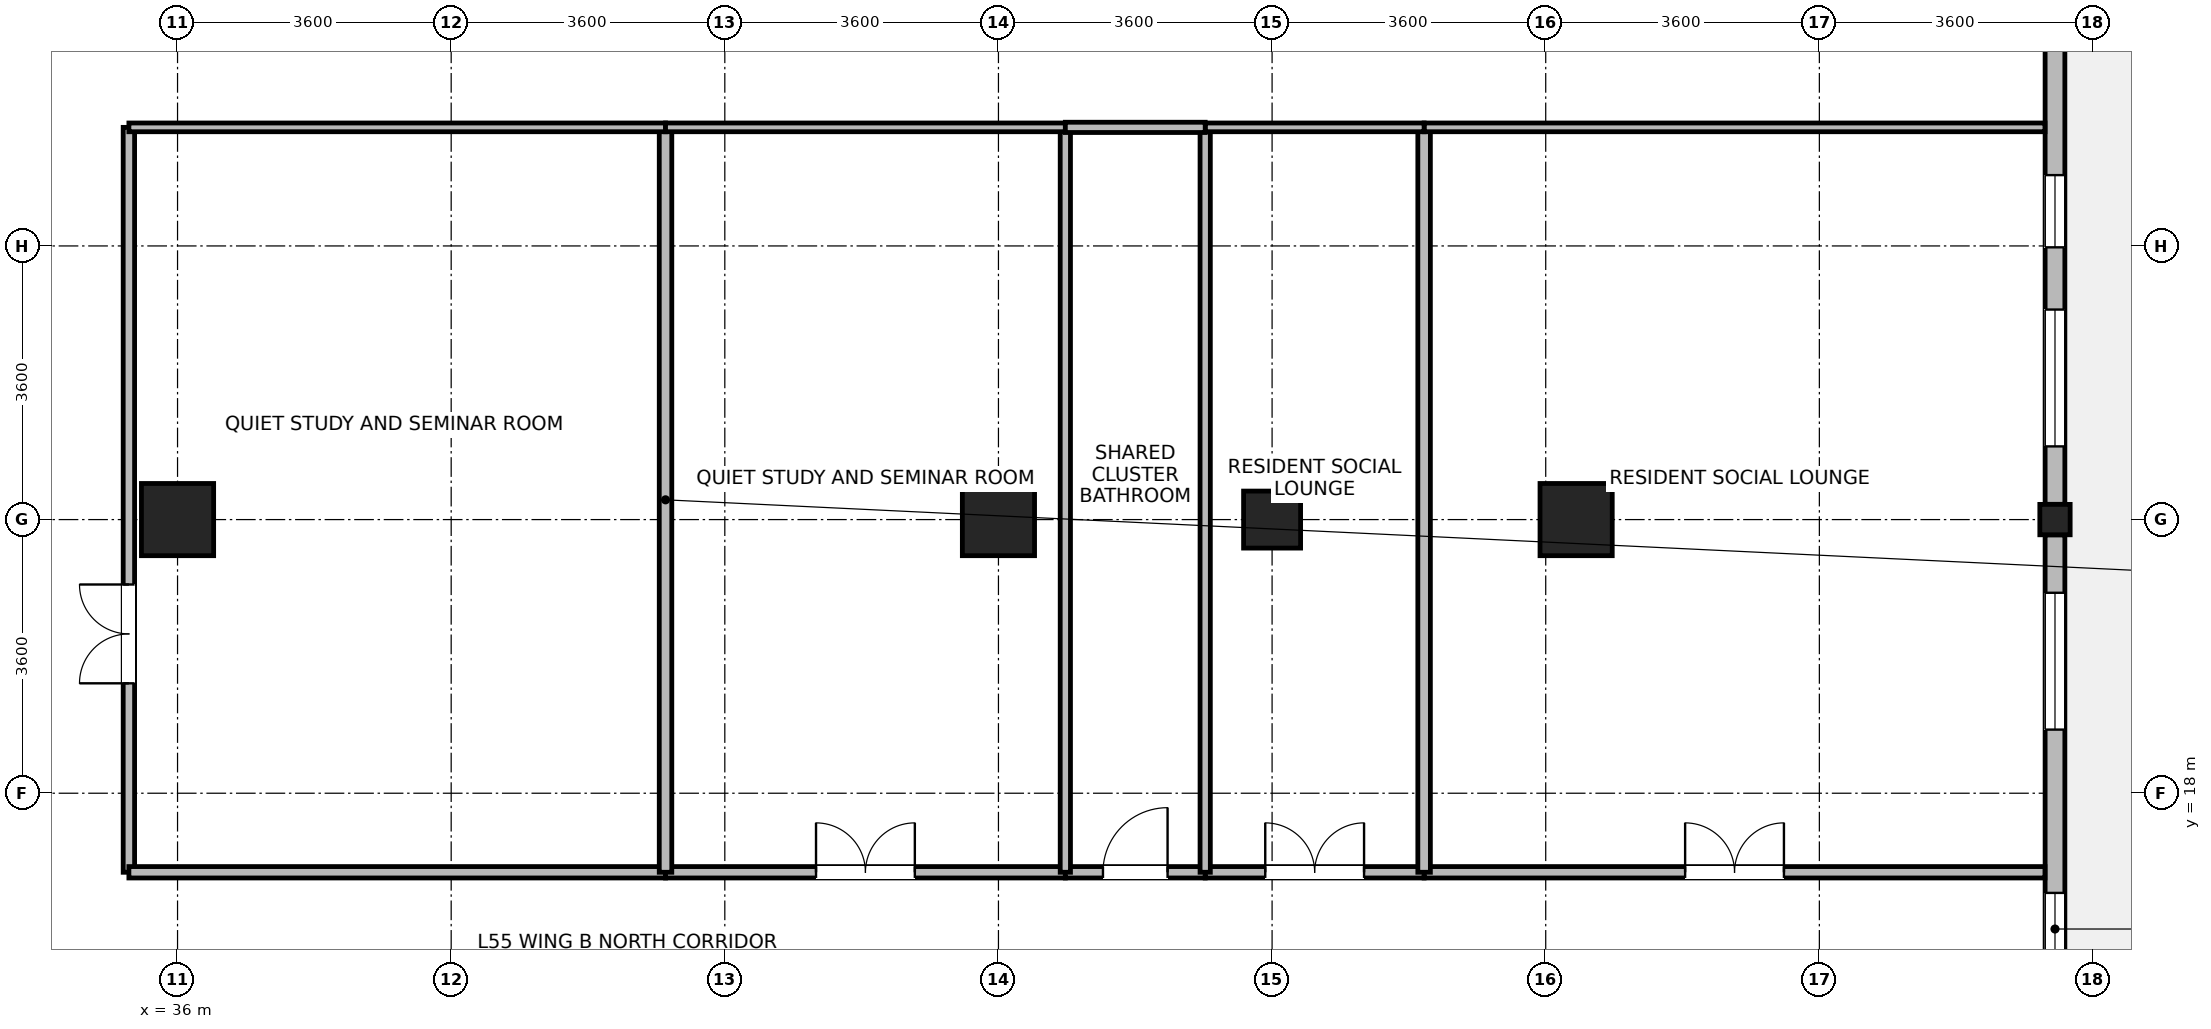
"""IFC4 building model, lengths in metres.
Left out: names, types, materials, properties, quantities, classifications, styles, units other than length and angle.
Written with IfcOpenShell. Run it as: python <this file> out.ifc"""

import sys

from ifc_helpers import new_model, si_unit, direction, frame, frame_2d, origin, origin_2d, place, context, subcontext, project, spatial, rectangle, i_section, extrude, source, transform, mapped, element, fill, save


model = new_model("IFC4")
c1 = context("Model", 3, precision=1e-05, world=origin(), true_north=direction((0.0, 1.0)))
c2 = subcontext(c1, "Body", "Model", "MODEL_VIEW")
j1 = project(units=[si_unit("LENGTHUNIT", "METRE"), si_unit("PLANEANGLEUNIT", "RADIAN")], contexts=[c1])
p1 = place(None, origin())
s1 = spatial("IfcSite", under=j1, at=p1, CompositionType="ELEMENT")
p2 = place(p1, origin())
s2 = spatial("IfcBuilding", under=s1, at=p2, CompositionType="ELEMENT")
p3 = place(p2, frame((0.0, 0.0, 216.6)))
s3 = spatial("IfcBuildingStorey", under=s2, at=p3, CompositionType="ELEMENT", Elevation=216.6)
m1 = source(origin(), c2, "Body", "SweptSolid", [
    extrude(rectangle(XDim=0.95, YDim=0.95, at=origin_2d()), origin(), (0.0, 0.0, 1.0), 3.7),
])
for number, where, z_axis, x_axis in (
    (1, (36.0, 21.6, 0.0), (0.0, 0.0, 1.0), (1.0, 0.0, 0.0)),
    (2, (46.8, 21.6, 0.0), (0.0, 0.0, 1.0), (1.0, 0.0, 0.0)),
):
    element("IfcColumn", number, at=place(p3, frame(where, z_axis=z_axis, x_axis=x_axis)), inside=s3, PredefinedType="COLUMN", context=c2, shape_type="MappedRepresentation", body=[
        mapped(m1, transform((0.0, 0.0, 0.0), x_axis=(1.0, 0.0, 0.0), y_axis=(0.0, 1.0, 0.0), z_axis=(0.0, 0.0, 1.0), scale=1.0)),
    ])
m2 = source(origin(), c2, "Body", "SweptSolid", [
    extrude(rectangle(XDim=0.75, YDim=0.75, at=origin_2d()), origin(), (0.0, 0.0, 1.0), 3.7),
])
p4 = place(p3, frame((50.4, 21.6, 0.0), z_axis=(0.0, 0.0, 1.0), x_axis=(1.0, 0.0, 0.0)))
e3 = element("IfcColumn", 3, at=p4, inside=s3, PredefinedType="PILASTER", context=c2, shape_type="MappedRepresentation", body=[
    mapped(m2, transform((0.0, 0.0, 0.0), x_axis=(1.0, 0.0, 0.0), y_axis=(0.0, 1.0, 0.0), z_axis=(0.0, 0.0, 1.0), scale=1.0)),
])
p5 = place(p3, frame((54.4, 21.6, 0.0), z_axis=(0.0, 0.0, 1.0), x_axis=(1.0, 0.0, 0.0)))
e4 = element("IfcColumn", 4, at=p5, inside=s3, PredefinedType="COLUMN", context=c2, shape_type="MappedRepresentation", body=[
    mapped(m1, transform((0.0, 0.0, 0.0), x_axis=(1.0, 0.0, 0.0), y_axis=(0.0, 1.0, 0.0), z_axis=(0.0, 0.0, 1.0), scale=1.0)),
])
m3 = source(origin(), c2, "Body", "SweptSolid", [
    extrude(i_section(OverallWidth=0.399, OverallDepth=0.4, WebThickness=0.017, FlangeThickness=0.023, FilletRadius=0.015, at=origin_2d()), origin(), (0.0, 0.0, 1.0), 3.7),
])
p6 = place(p3, frame((60.7, 21.6, 0.0), z_axis=(0.0, 0.0, 1.0), x_axis=(1.0, 0.0, 0.0)))
e5 = element("IfcColumn", 5, at=p6, inside=s3, PredefinedType="COLUMN", context=c2, shape_type="MappedRepresentation", body=[
    mapped(m3, transform((0.0, 0.0, 0.0), x_axis=(1.0, 0.0, 0.0), y_axis=(0.0, 1.0, 0.0), z_axis=(0.0, 0.0, 1.0), scale=1.0)),
])
p7 = place(p3, frame((60.7, 21.399, 0.0), z_axis=(0.0, 0.0, 1.0), x_axis=(0.0, -1.0, 0.0)))
e6 = element("IfcWall", 6, at=p7, inside=s3, PredefinedType="STANDARD", context=c2, shape_type="SweptSolid", body=[
    extrude(rectangle(XDim=6.648, YDim=0.26, at=frame_2d((3.324, 0.0))), origin(), (0.0, 0.0, 1.0), 3.05),
])
p8 = place(p7, frame((0.762, 0.0, 0.85)))
e7 = element("IfcOpeningElement", 7, at=p8, cuts=e6, PredefinedType="OPENING", context=c2, shape_type="SweptSolid", body=[
    extrude(rectangle(XDim=1.8, YDim=1.85, at=frame_2d((0.9, 0.925))), frame((0.0, 0.14, 0.0), z_axis=(0.0, -1.0, 0.0), x_axis=(1.0, 0.0, 0.0)), (0.0, 0.0, 1.0), 0.28),
])
p9 = place(p7, frame((4.71, 0.0, 0.85)))
e8 = element("IfcOpeningElement", 8, at=p9, cuts=e6, PredefinedType="OPENING", context=c2, shape_type="SweptSolid", body=[
    extrude(rectangle(XDim=0.95, YDim=1.75, at=frame_2d((0.475, 0.875))), frame((0.0, 0.14, 0.0), z_axis=(0.0, -1.0, 0.0), x_axis=(1.0, 0.0, 0.0)), (0.0, 0.0, 1.0), 0.28),
])
p10 = place(p3, frame((60.7, 28.449, 0.0), z_axis=(0.0, 0.0, 1.0), x_axis=(0.0, -1.0, 0.0)))
e9 = element("IfcWall", 9, at=p10, inside=s3, PredefinedType="STANDARD", context=c2, shape_type="SweptSolid", body=[
    extrude(rectangle(XDim=6.648, YDim=0.26, at=frame_2d((3.324, 0.0))), origin(), (0.0, 0.0, 1.0), 3.05),
])
p11 = place(p10, frame((4.086, 0.0, 0.85)))
e10 = element("IfcOpeningElement", 10, at=p11, cuts=e9, PredefinedType="OPENING", context=c2, shape_type="SweptSolid", body=[
    extrude(rectangle(XDim=1.8, YDim=1.85, at=frame_2d((0.9, 0.925))), frame((0.0, 0.14, 0.0), z_axis=(0.0, -1.0, 0.0), x_axis=(1.0, 0.0, 0.0)), (0.0, 0.0, 1.0), 0.28),
])
p12 = place(p10, frame((2.317, 0.0, 0.85)))
e11 = element("IfcOpeningElement", 11, at=p12, cuts=e9, PredefinedType="OPENING", context=c2, shape_type="SweptSolid", body=[
    extrude(rectangle(XDim=0.95, YDim=1.75, at=frame_2d((0.475, 0.875))), frame((0.0, 0.14, 0.0), z_axis=(0.0, -1.0, 0.0), x_axis=(1.0, 0.0, 0.0)), (0.0, 0.0, 1.0), 0.28),
])
p13 = place(p3, frame((35.36, 16.96, 0.0), z_axis=(0.0, 0.0, 1.0), x_axis=(0.0, 1.0, 0.0)))
e12 = element("IfcWall", 12, at=p13, inside=s3, PredefinedType="PARTITIONING", context=c2, shape_type="SweptSolid", body=[
    extrude(rectangle(XDim=9.8, YDim=0.15, at=frame_2d((4.9, 0.0))), origin(), (0.0, 0.0, 1.0), 3.45),
])
p14 = place(p13, frame((2.486, 0.0, 0.0)))
e13 = element("IfcOpeningElement", 13, at=p14, cuts=e12, PredefinedType="OPENING", context=c2, shape_type="SweptSolid", body=[
    extrude(rectangle(XDim=1.3, YDim=2.12, at=frame_2d((0.65, 1.06))), frame((0.0, 0.085, 0.0), z_axis=(0.0, -1.0, 0.0), x_axis=(1.0, 0.0, 0.0)), (0.0, 0.0, 1.0), 0.17),
])
p15 = place(p3, frame((52.4, 16.96, 0.0), z_axis=(0.0, 0.0, 1.0), x_axis=(1.0, 0.0, 0.0)))
e14 = element("IfcWall", 14, at=p15, inside=s3, PredefinedType="PARTITIONING", context=c2, shape_type="SweptSolid", body=[
    extrude(rectangle(XDim=8.168, YDim=0.15, at=frame_2d((4.084, 0.0))), origin(), (0.0, 0.0, 1.0), 3.45),
])
p16 = place(p15, frame((3.434, 0.0, 0.0)))
e15 = element("IfcOpeningElement", 15, at=p16, cuts=e14, PredefinedType="OPENING", context=c2, shape_type="SweptSolid", body=[
    extrude(rectangle(XDim=1.3, YDim=2.12, at=frame_2d((0.65, 1.06))), frame((0.0, 0.085, 0.0), z_axis=(0.0, -1.0, 0.0), x_axis=(1.0, 0.0, 0.0)), (0.0, 0.0, 1.0), 0.17),
])
p17 = place(p3, frame((35.36, 16.96, 0.0), z_axis=(0.0, 0.0, 1.0), x_axis=(1.0, 0.0, 0.0)))
e16 = element("IfcWall", 16, at=p17, inside=s3, PredefinedType="PARTITIONING", context=c2, shape_type="SweptSolid", body=[
    extrude(rectangle(XDim=7.06, YDim=0.15, at=frame_2d((3.53, 0.0))), origin(), (0.0, 0.0, 1.0), 3.45),
])
p18 = place(p3, frame((42.42, 16.96, 0.0), z_axis=(0.0, 0.0, 1.0), x_axis=(1.0, 0.0, 0.0)))
e17 = element("IfcWall", 17, at=p18, inside=s3, PredefinedType="PARTITIONING", context=c2, shape_type="SweptSolid", body=[
    extrude(rectangle(XDim=5.26, YDim=0.15, at=frame_2d((2.63, 0.0))), origin(), (0.0, 0.0, 1.0), 3.45),
])
p19 = place(p18, frame((1.98, 0.0, 0.0)))
e18 = element("IfcOpeningElement", 18, at=p19, cuts=e17, PredefinedType="OPENING", context=c2, shape_type="SweptSolid", body=[
    extrude(rectangle(XDim=1.3, YDim=2.12, at=frame_2d((0.65, 1.06))), frame((0.0, 0.085, 0.0), z_axis=(0.0, -1.0, 0.0), x_axis=(1.0, 0.0, 0.0)), (0.0, 0.0, 1.0), 0.17),
])
p20 = place(p3, frame((49.52, 16.96, 0.0), z_axis=(0.0, 0.0, 1.0), x_axis=(1.0, 0.0, 0.0)))
e19 = element("IfcWall", 19, at=p20, inside=s3, PredefinedType="PARTITIONING", context=c2, shape_type="SweptSolid", body=[
    extrude(rectangle(XDim=2.88, YDim=0.15, at=frame_2d((1.44, 0.0))), origin(), (0.0, 0.0, 1.0), 3.45),
])
p21 = place(p20, frame((0.79, 0.0, 0.0)))
e20 = element("IfcOpeningElement", 20, at=p21, cuts=e19, PredefinedType="OPENING", context=c2, shape_type="SweptSolid", body=[
    extrude(rectangle(XDim=1.3, YDim=2.12, at=frame_2d((0.65, 1.06))), frame((0.0, 0.085, 0.0), z_axis=(0.0, -1.0, 0.0), x_axis=(1.0, 0.0, 0.0)), (0.0, 0.0, 1.0), 0.17),
])
p22 = place(p3, frame((47.68, 16.96, 0.0), z_axis=(0.0, 0.0, 1.0), x_axis=(1.0, 0.0, 0.0)))
e21 = element("IfcWall", 21, at=p22, inside=s3, PredefinedType="PARTITIONING", context=c2, shape_type="SweptSolid", body=[
    extrude(rectangle(XDim=1.84, YDim=0.15, at=frame_2d((0.92, 0.0))), origin(), (0.0, 0.0, 1.0), 3.45),
])
p23 = place(p22, frame((0.495, 0.0, 0.0)))
e22 = element("IfcOpeningElement", 22, at=p23, cuts=e21, PredefinedType="OPENING", context=c2, shape_type="SweptSolid", body=[
    extrude(rectangle(XDim=0.85, YDim=2.04, at=frame_2d((0.425, 1.02))), frame((0.0, 0.085, 0.0), z_axis=(0.0, -1.0, 0.0), x_axis=(1.0, 0.0, 0.0)), (0.0, 0.0, 1.0), 0.17),
])
p24 = place(p3, frame((42.42, 16.96, 0.0), z_axis=(0.0, 0.0, 1.0), x_axis=(0.0, 1.0, 0.0)))
e23 = element("IfcWall", 23, at=p24, inside=s3, PredefinedType="PARTITIONING", context=c2, shape_type="SweptSolid", body=[
    extrude(rectangle(XDim=9.8, YDim=0.165, at=frame_2d((4.9, 0.0))), origin(), (0.0, 0.0, 1.0), 3.45),
])
for number, where, z_axis, x_axis in (
    (24, (47.68, 16.96, 0.0), (0.0, 0.0, 1.0), (0.0, 1.0, 0.0)),
    (25, (49.52, 16.96, 0.0), (0.0, 0.0, 1.0), (0.0, 1.0, 0.0)),
):
    element("IfcWall", number, at=place(p3, frame(where, z_axis=z_axis, x_axis=x_axis)), inside=s3, PredefinedType="PARTITIONING", context=c2, shape_type="SweptSolid", body=[
        extrude(rectangle(XDim=9.8, YDim=0.135, at=frame_2d((4.9, 0.0))), origin(), (0.0, 0.0, 1.0), 3.45),
    ])
p25 = place(p3, frame((52.4, 16.96, 0.0), z_axis=(0.0, 0.0, 1.0), x_axis=(0.0, 1.0, 0.0)))
e26 = element("IfcWall", 26, at=p25, inside=s3, PredefinedType="PARTITIONING", context=c2, shape_type="SweptSolid", body=[
    extrude(rectangle(XDim=9.8, YDim=0.165, at=frame_2d((4.9, 0.0))), origin(), (0.0, 0.0, 1.0), 3.45),
])
p26 = place(p3, frame((52.4, 26.76, 0.0), z_axis=(0.0, 0.0, 1.0), x_axis=(1.0, 0.0, 0.0)))
e27 = element("IfcWall", 27, at=p26, inside=s3, PredefinedType="PARTITIONING", context=c2, shape_type="SweptSolid", body=[
    extrude(rectangle(XDim=8.168, YDim=0.115, at=frame_2d((4.084, 0.0))), origin(), (0.0, 0.0, 1.0), 3.45),
])
p27 = place(p3, frame((35.36, 26.76, 0.0), z_axis=(0.0, 0.0, 1.0), x_axis=(1.0, 0.0, 0.0)))
e28 = element("IfcWall", 28, at=p27, inside=s3, PredefinedType="PARTITIONING", context=c2, shape_type="SweptSolid", body=[
    extrude(rectangle(XDim=7.06, YDim=0.115, at=frame_2d((3.53, 0.0))), origin(), (0.0, 0.0, 1.0), 3.45),
])
p28 = place(p3, frame((42.42, 26.76, 0.0), z_axis=(0.0, 0.0, 1.0), x_axis=(1.0, 0.0, 0.0)))
e29 = element("IfcWall", 29, at=p28, inside=s3, PredefinedType="PARTITIONING", context=c2, shape_type="SweptSolid", body=[
    extrude(rectangle(XDim=5.26, YDim=0.115, at=frame_2d((2.63, 0.0))), origin(), (0.0, 0.0, 1.0), 3.45),
])
p29 = place(p3, frame((49.52, 26.76, 0.0), z_axis=(0.0, 0.0, 1.0), x_axis=(1.0, 0.0, 0.0)))
e30 = element("IfcWall", 30, at=p29, inside=s3, PredefinedType="PARTITIONING", context=c2, shape_type="SweptSolid", body=[
    extrude(rectangle(XDim=2.88, YDim=0.115, at=frame_2d((1.44, 0.0))), origin(), (0.0, 0.0, 1.0), 3.45),
])
p30 = place(p3, frame((47.68, 26.76, 0.0), z_axis=(0.0, 0.0, 1.0), x_axis=(1.0, 0.0, 0.0)))
e31 = element("IfcWall", 31, at=p30, inside=s3, PredefinedType="PARTITIONING", context=c2, shape_type="SweptSolid", body=[
    extrude(rectangle(XDim=1.84, YDim=0.135, at=frame_2d((0.92, 0.0))), origin(), (0.0, 0.0, 1.0), 3.45),
])
p31 = place(p8, origin())
e32 = element("IfcWindow", 32, at=p31, inside=s3, PartitioningType="SINGLE_PANEL", PredefinedType="WINDOW", context=c2, shape_type="SweptSolid", body=[
    extrude(rectangle(XDim=1.8, YDim=1.85, at=frame_2d((0.9, 0.925))), frame((0.0, 0.03, 0.0), z_axis=(0.0, -1.0, 0.0), x_axis=(1.0, 0.0, 0.0)), (0.0, 0.0, 1.0), 0.06),
])
fill(e7, e32)
p32 = place(p9, origin())
e33 = element("IfcWindow", 33, at=p32, inside=s3, PartitioningType="SINGLE_PANEL", PredefinedType="WINDOW", context=c2, shape_type="SweptSolid", body=[
    extrude(rectangle(XDim=0.95, YDim=1.75, at=frame_2d((0.475, 0.875))), frame((0.0, 0.03, 0.0), z_axis=(0.0, -1.0, 0.0), x_axis=(1.0, 0.0, 0.0)), (0.0, 0.0, 1.0), 0.06),
])
fill(e8, e33)
p33 = place(p11, origin())
e34 = element("IfcWindow", 34, at=p33, inside=s3, PartitioningType="SINGLE_PANEL", PredefinedType="WINDOW", context=c2, shape_type="SweptSolid", body=[
    extrude(rectangle(XDim=1.8, YDim=1.85, at=frame_2d((0.9, 0.925))), frame((0.0, 0.03, 0.0), z_axis=(0.0, -1.0, 0.0), x_axis=(1.0, 0.0, 0.0)), (0.0, 0.0, 1.0), 0.06),
])
fill(e10, e34)
p34 = place(p12, origin())
e35 = element("IfcWindow", 35, at=p34, inside=s3, PartitioningType="SINGLE_PANEL", PredefinedType="WINDOW", context=c2, shape_type="SweptSolid", body=[
    extrude(rectangle(XDim=0.95, YDim=1.75, at=frame_2d((0.475, 0.875))), frame((0.0, 0.03, 0.0), z_axis=(0.0, -1.0, 0.0), x_axis=(1.0, 0.0, 0.0)), (0.0, 0.0, 1.0), 0.06),
])
fill(e11, e35)
p35 = place(p14, origin())
e36 = element("IfcDoor", 36, at=p35, inside=s3, OperationType="DOUBLE_DOOR_SINGLE_SWING", PredefinedType="DOOR", context=c2, shape_type="SweptSolid", body=[
    extrude(rectangle(XDim=1.3, YDim=2.12, at=frame_2d((0.65, 1.06))), frame((0.0, 0.025, 0.0), z_axis=(0.0, -1.0, 0.0), x_axis=(1.0, 0.0, 0.0)), (0.0, 0.0, 1.0), 0.05),
])
fill(e13, e36)
p36 = place(p16, origin())
e37 = element("IfcDoor", 37, at=p36, inside=s3, OperationType="DOUBLE_DOOR_SINGLE_SWING", PredefinedType="DOOR", context=c2, shape_type="SweptSolid", body=[
    extrude(rectangle(XDim=1.3, YDim=2.12, at=frame_2d((0.65, 1.06))), frame((0.0, 0.025, 0.0), z_axis=(0.0, -1.0, 0.0), x_axis=(1.0, 0.0, 0.0)), (0.0, 0.0, 1.0), 0.05),
])
fill(e15, e37)
p37 = place(p19, origin())
e38 = element("IfcDoor", 38, at=p37, inside=s3, OperationType="DOUBLE_DOOR_SINGLE_SWING", PredefinedType="DOOR", context=c2, shape_type="SweptSolid", body=[
    extrude(rectangle(XDim=1.3, YDim=2.12, at=frame_2d((0.65, 1.06))), frame((0.0, 0.025, 0.0), z_axis=(0.0, -1.0, 0.0), x_axis=(1.0, 0.0, 0.0)), (0.0, 0.0, 1.0), 0.05),
])
fill(e18, e38)
p38 = place(p21, origin())
e39 = element("IfcDoor", 39, at=p38, inside=s3, OperationType="DOUBLE_DOOR_SINGLE_SWING", PredefinedType="DOOR", context=c2, shape_type="SweptSolid", body=[
    extrude(rectangle(XDim=1.3, YDim=2.12, at=frame_2d((0.65, 1.06))), frame((0.0, 0.025, 0.0), z_axis=(0.0, -1.0, 0.0), x_axis=(1.0, 0.0, 0.0)), (0.0, 0.0, 1.0), 0.05),
])
fill(e20, e39)
p39 = place(p23, origin())
e40 = element("IfcDoor", 40, at=p39, inside=s3, OperationType="SINGLE_SWING_RIGHT", PredefinedType="DOOR", context=c2, shape_type="SweptSolid", body=[
    extrude(rectangle(XDim=0.85, YDim=2.04, at=frame_2d((0.425, 1.02))), frame((0.0, 0.025, 0.0), z_axis=(0.0, -1.0, 0.0), x_axis=(1.0, 0.0, 0.0)), (0.0, 0.0, 1.0), 0.05),
])
fill(e22, e40)
save(model, sys.argv[1])
